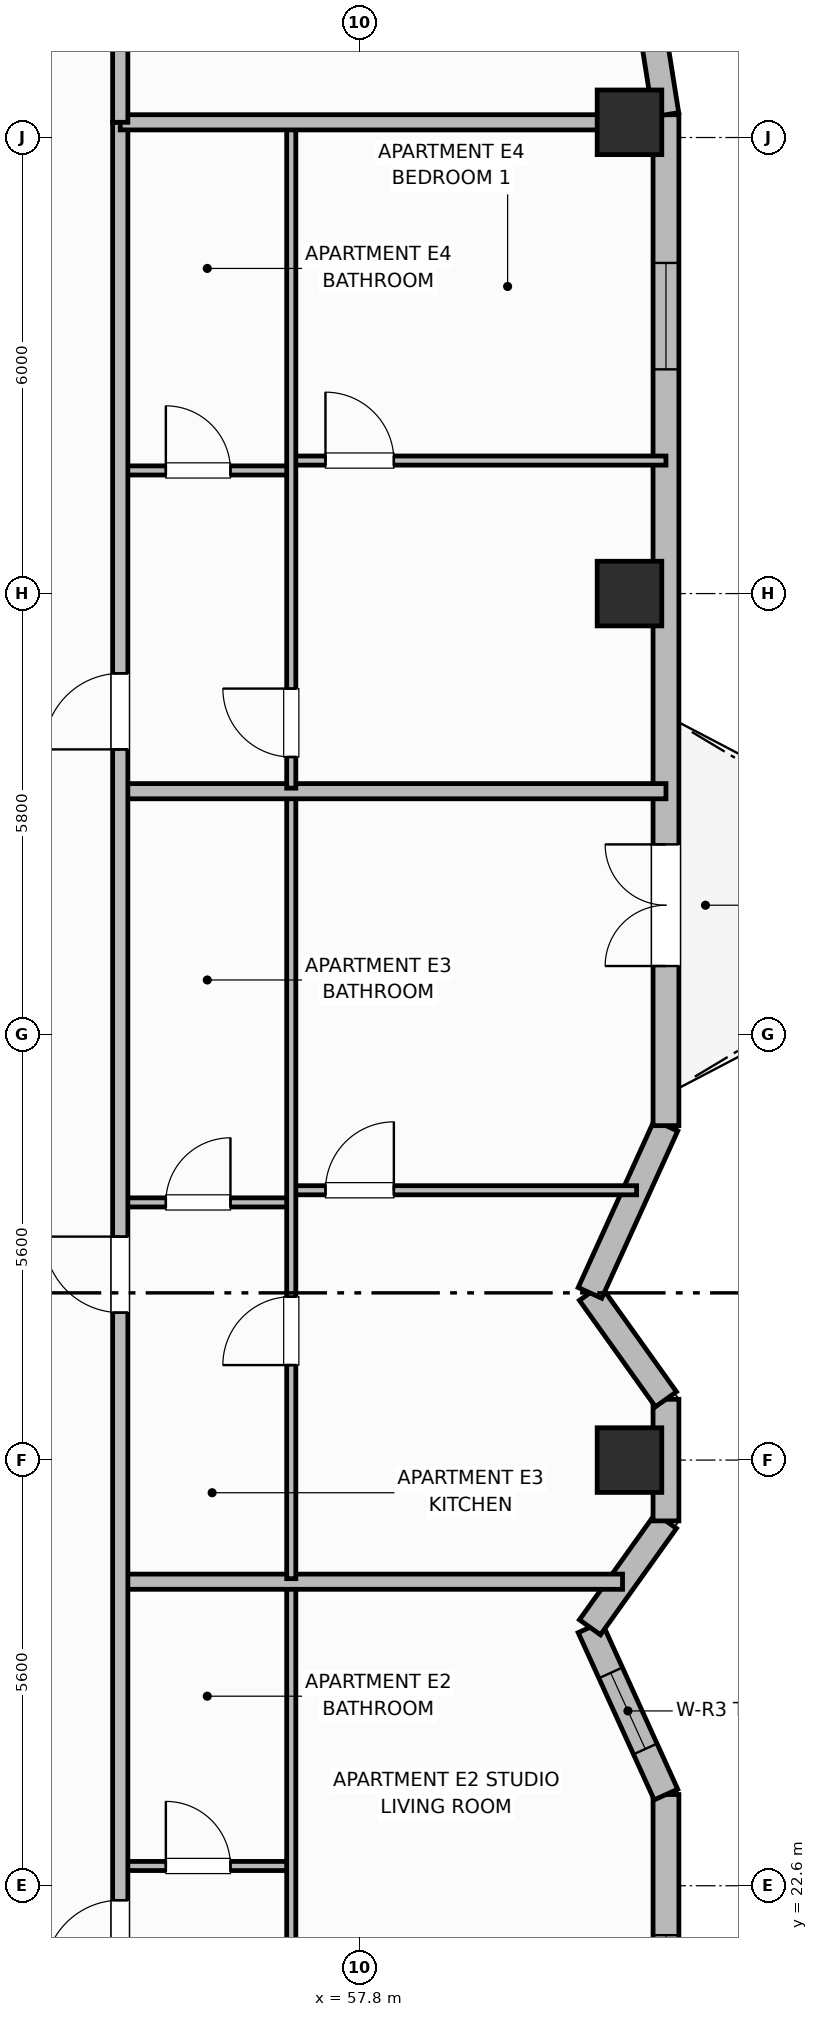
"""IFC4 building model, lengths in metres.
Left out: names, types, materials, properties, quantities, classifications, styles, units other than length and angle.
Written with IfcOpenShell. Run it as: python <this file> out.ifc"""

import sys

from ifc_helpers import new_model, si_unit, direction, frame, frame_2d, origin, origin_2d, place, context, subcontext, project, spatial, rectangle, extrude, element, fill, save


model = new_model("IFC4")
c1 = context("Model", 3, precision=1e-05, world=origin(), true_north=direction((0.0, 1.0)))
c2 = subcontext(c1, "Body", "Model", "MODEL_VIEW")
j1 = project(units=[si_unit("LENGTHUNIT", "METRE"), si_unit("PLANEANGLEUNIT", "RADIAN")], contexts=[c1])
p1 = place(None, origin())
s1 = spatial("IfcSite", under=j1, at=p1, CompositionType="ELEMENT")
p2 = place(p1, origin())
s2 = spatial("IfcBuilding", under=s1, at=p2, CompositionType="ELEMENT")
p3 = place(p2, frame((0.0, 0.0, 222.1)))
s3 = spatial("IfcBuildingStorey", under=s2, at=p3, CompositionType="ELEMENT", Elevation=222.1)
for number, where, z_axis, x_axis in (
    (1, (61.35, 28.2, 0.0), (0.0, 0.0, 1.0), (1.0, 0.0, 0.0)),
    (2, (61.35, 39.6, 0.0), (0.0, 0.0, 1.0), (1.0, 0.0, 0.0)),
    (3, (61.35, 45.8, 0.0), (0.0, 0.0, 1.0), (1.0, 0.0, 0.0)),
):
    element("IfcColumn", number, at=place(p3, frame(where, z_axis=z_axis, x_axis=x_axis)), inside=s3, PredefinedType="COLUMN", context=c2, shape_type="SweptSolid", body=[
        extrude(rectangle(XDim=0.85, YDim=0.85, at=origin_2d()), origin(), (0.0, 0.0, 1.0), 3.7),
    ])
p4 = place(p3, frame((61.83, 10.5, 0.0), z_axis=(0.0, 0.0, 1.0), x_axis=(0.0, 1.0, 0.0)))
e4 = element("IfcWall", 4, at=p4, inside=s3, PredefinedType="SOLIDWALL", context=c2, shape_type="SweptSolid", body=[
    extrude(rectangle(XDim=13.3, YDim=0.34, at=frame_2d((6.65, 0.0))), origin(), (0.0, 0.0, 1.0), 2.26),
])
p5 = place(p4, frame((1.85, 0.0, 0.3)))
e5 = element("IfcOpeningElement", 5, at=p5, cuts=e4, PredefinedType="OPENING", context=c2, shape_type="SweptSolid", body=[
    extrude(rectangle(XDim=1.6, YDim=1.9, at=frame_2d((0.8, 0.95))), frame((0.0, 0.18, 0.0), z_axis=(0.0, -1.0, 0.0), x_axis=(1.0, 0.0, 0.0)), (0.0, 0.0, 1.0), 0.36),
])
p6 = place(p4, frame((6.8, 0.0, 0.35)))
e6 = element("IfcOpeningElement", 6, at=p6, cuts=e4, PredefinedType="OPENING", context=c2, shape_type="SweptSolid", body=[
    extrude(rectangle(XDim=1.4, YDim=1.85, at=frame_2d((0.7, 0.925))), frame((0.0, 0.18, 0.0), z_axis=(0.0, -1.0, 0.0), x_axis=(1.0, 0.0, 0.0)), (0.0, 0.0, 1.0), 0.36),
])
p7 = place(p4, frame((9.85, 0.0, 0.3)))
e7 = element("IfcOpeningElement", 7, at=p7, cuts=e4, PredefinedType="OPENING", context=c2, shape_type="SweptSolid", body=[
    extrude(rectangle(XDim=1.6, YDim=1.9, at=frame_2d((0.8, 0.95))), frame((0.0, 0.18, 0.0), z_axis=(0.0, -1.0, 0.0), x_axis=(1.0, 0.0, 0.0)), (0.0, 0.0, 1.0), 0.36),
])
p8 = place(p3, frame((61.83, 23.8, 0.0), z_axis=(0.0, 0.0, 1.0), x_axis=(-0.413810555983, 0.910363017569, 0.0)))
e8 = element("IfcWall", 8, at=p8, inside=s3, PredefinedType="SOLIDWALL", context=c2, shape_type="SweptSolid", body=[
    extrude(rectangle(XDim=2.417, YDim=0.34, at=frame_2d((1.208, 0.0))), origin(), (0.0, 0.0, 1.0), 2.26),
])
p9 = place(p8, frame((0.658, 0.0, 0.45)))
e9 = element("IfcOpeningElement", 9, at=p9, cuts=e8, PredefinedType="OPENING", context=c2, shape_type="SweptSolid", body=[
    extrude(rectangle(XDim=1.1, YDim=1.65, at=frame_2d((0.55, 0.825))), frame((0.0, 0.18, 0.0), z_axis=(0.0, -1.0, 0.0), x_axis=(1.0, 0.0, 0.0)), (0.0, 0.0, 1.0), 0.36),
])
p10 = place(p3, frame((60.83, 26.0, 0.0), z_axis=(0.0, 0.0, 1.0), x_axis=(0.581265041318, 0.813714293681, 0.0)))
e10 = element("IfcWall", 10, at=p10, inside=s3, PredefinedType="SOLIDWALL", context=c2, shape_type="SweptSolid", body=[
    extrude(rectangle(XDim=1.72, YDim=0.34, at=frame_2d((0.86, 0.0))), origin(), (0.0, 0.0, 1.0), 2.26),
])
p11 = place(p3, frame((61.83, 27.4, 0.0), z_axis=(0.0, 0.0, 1.0), x_axis=(0.0, 1.0, 0.0)))
e11 = element("IfcWall", 11, at=p11, inside=s3, PredefinedType="SOLIDWALL", context=c2, shape_type="SweptSolid", body=[
    extrude(rectangle(XDim=1.6, YDim=0.34, at=frame_2d((0.8, 0.0))), origin(), (0.0, 0.0, 1.0), 2.26),
])
p12 = place(p3, frame((61.83, 29.0, 0.0), z_axis=(0.0, 0.0, 1.0), x_axis=(-0.581265041318, 0.813714293681, 0.0)))
e12 = element("IfcWall", 12, at=p12, inside=s3, PredefinedType="SOLIDWALL", context=c2, shape_type="SweptSolid", body=[
    extrude(rectangle(XDim=1.72, YDim=0.34, at=frame_2d((0.86, 0.0))), origin(), (0.0, 0.0, 1.0), 2.26),
])
p13 = place(p3, frame((60.83, 30.4, 0.0), z_axis=(0.0, 0.0, 1.0), x_axis=(0.413772500085, 0.910380315128, 0.0)))
e13 = element("IfcWall", 13, at=p13, inside=s3, PredefinedType="SOLIDWALL", context=c2, shape_type="SweptSolid", body=[
    extrude(rectangle(XDim=2.417, YDim=0.34, at=frame_2d((1.208, 0.0))), origin(), (0.0, 0.0, 1.0), 2.26),
])
p14 = place(p3, frame((61.83, 32.6, 0.0), z_axis=(0.0, 0.0, 1.0), x_axis=(0.0, 1.0, 0.0)))
e14 = element("IfcWall", 14, at=p14, inside=s3, PredefinedType="SOLIDWALL", context=c2, shape_type="SweptSolid", body=[
    extrude(rectangle(XDim=13.3, YDim=0.34, at=frame_2d((6.65, 0.0))), origin(), (0.0, 0.0, 1.0), 2.26),
])
p15 = place(p14, frame((2.1, 0.0, 0.0)))
e15 = element("IfcOpeningElement", 15, at=p15, cuts=e14, PredefinedType="OPENING", context=c2, shape_type="SweptSolid", body=[
    extrude(rectangle(XDim=1.6, YDim=2.1, at=frame_2d((0.8, 1.05))), frame((0.0, 0.18, 0.0), z_axis=(0.0, -1.0, 0.0), x_axis=(1.0, 0.0, 0.0)), (0.0, 0.0, 1.0), 0.36),
])
p16 = place(p14, frame((9.95, 0.0, 0.3)))
e16 = element("IfcOpeningElement", 16, at=p16, cuts=e14, PredefinedType="OPENING", context=c2, shape_type="SweptSolid", body=[
    extrude(rectangle(XDim=1.4, YDim=1.85, at=frame_2d((0.7, 0.925))), frame((0.0, 0.18, 0.0), z_axis=(0.0, -1.0, 0.0), x_axis=(1.0, 0.0, 0.0)), (0.0, 0.0, 1.0), 0.36),
])
p17 = place(p3, frame((61.83, 45.9, 0.0), z_axis=(0.0, 0.0, 1.0), x_axis=(-0.156481329164, 0.987680916907, 0.0)))
e17 = element("IfcWall", 17, at=p17, inside=s3, PredefinedType="SOLIDWALL", context=c2, shape_type="SweptSolid", body=[
    extrude(rectangle(XDim=1.136, YDim=0.34, at=frame_2d((0.568, 0.0))), origin(), (0.0, 0.0, 1.0), 2.26),
])
p18 = place(p3, frame((54.65, 22.86, 0.0), z_axis=(0.0, 0.0, 1.0), x_axis=(1.0, 0.0, 0.0)))
e18 = element("IfcWall", 18, at=p18, inside=s3, PredefinedType="PARTITIONING", context=c2, shape_type="SweptSolid", body=[
    extrude(rectangle(XDim=2.25, YDim=0.12, at=frame_2d((1.125, 0.0))), origin(), (0.0, 0.0, 1.0), 2.24),
])
p19 = place(p18, frame((0.6, 0.0, 0.0)))
e19 = element("IfcOpeningElement", 19, at=p19, cuts=e18, PredefinedType="OPENING", context=c2, shape_type="SweptSolid", body=[
    extrude(rectangle(XDim=0.85, YDim=2.1, at=frame_2d((0.425, 1.05))), frame((0.0, 0.07, 0.0), z_axis=(0.0, -1.0, 0.0), x_axis=(1.0, 0.0, 0.0)), (0.0, 0.0, 1.0), 0.14),
])
p20 = place(p3, frame((56.9, 19.44, 0.0), z_axis=(0.0, 0.0, 1.0), x_axis=(0.0, 1.0, 0.0)))
e20 = element("IfcWall", 20, at=p20, inside=s3, PredefinedType="PARTITIONING", context=c2, shape_type="SweptSolid", body=[
    extrude(rectangle(XDim=7.12, YDim=0.12, at=frame_2d((3.56, 0.0))), origin(), (0.0, 0.0, 1.0), 2.24),
])
p21 = place(p20, frame((0.41, 0.0, 0.0)))
e21 = element("IfcOpeningElement", 21, at=p21, cuts=e20, PredefinedType="OPENING", context=c2, shape_type="SweptSolid", body=[
    extrude(rectangle(XDim=0.9, YDim=2.1, at=frame_2d((0.45, 1.05))), frame((0.0, 0.07, 0.0), z_axis=(0.0, -1.0, 0.0), x_axis=(1.0, 0.0, 0.0)), (0.0, 0.0, 1.0), 0.14),
])
p22 = place(p3, frame((54.65, 26.6, 0.0), z_axis=(0.0, 0.0, 1.0), x_axis=(1.0, 0.0, 0.0)))
e22 = element("IfcWall", 22, at=p22, inside=s3, PredefinedType="PARTITIONING", context=c2, shape_type="SweptSolid", body=[
    extrude(rectangle(XDim=6.609, YDim=0.2, at=frame_2d((3.304, 0.0))), origin(), (0.0, 0.0, 1.0), 2.24),
])
p23 = place(p3, frame((54.65, 31.59, 0.0), z_axis=(0.0, 0.0, 1.0), x_axis=(1.0, 0.0, 0.0)))
e23 = element("IfcWall", 23, at=p23, inside=s3, PredefinedType="PARTITIONING", context=c2, shape_type="SweptSolid", body=[
    extrude(rectangle(XDim=2.25, YDim=0.12, at=frame_2d((1.125, 0.0))), origin(), (0.0, 0.0, 1.0), 2.24),
])
p24 = place(p23, frame((0.6, 0.0, 0.0)))
e24 = element("IfcOpeningElement", 24, at=p24, cuts=e23, PredefinedType="OPENING", context=c2, shape_type="SweptSolid", body=[
    extrude(rectangle(XDim=0.85, YDim=2.1, at=frame_2d((0.425, 1.05))), frame((0.0, 0.07, 0.0), z_axis=(0.0, -1.0, 0.0), x_axis=(1.0, 0.0, 0.0)), (0.0, 0.0, 1.0), 0.14),
])
p25 = place(p3, frame((56.9, 31.75, 0.0), z_axis=(0.0, 0.0, 1.0), x_axis=(1.0, 0.0, 0.0)))
e25 = element("IfcWall", 25, at=p25, inside=s3, PredefinedType="PARTITIONING", context=c2, shape_type="SweptSolid", body=[
    extrude(rectangle(XDim=4.544, YDim=0.12, at=frame_2d((2.272, 0.0))), origin(), (0.0, 0.0, 1.0), 2.24),
])
p26 = place(p25, frame((0.45, 0.0, 0.0)))
e26 = element("IfcOpeningElement", 26, at=p26, cuts=e25, PredefinedType="OPENING", context=c2, shape_type="SweptSolid", body=[
    extrude(rectangle(XDim=0.9, YDim=2.1, at=frame_2d((0.45, 1.05))), frame((0.0, 0.07, 0.0), z_axis=(0.0, -1.0, 0.0), x_axis=(1.0, 0.0, 0.0)), (0.0, 0.0, 1.0), 0.14),
])
p27 = place(p3, frame((56.9, 26.64, 0.0), z_axis=(0.0, 0.0, 1.0), x_axis=(0.0, 1.0, 0.0)))
e27 = element("IfcWall", 27, at=p27, inside=s3, PredefinedType="PARTITIONING", context=c2, shape_type="SweptSolid", body=[
    extrude(rectangle(XDim=10.32, YDim=0.12, at=frame_2d((5.16, 0.0))), origin(), (0.0, 0.0, 1.0), 2.24),
])
p28 = place(p27, frame((2.81, 0.0, 0.0)))
e28 = element("IfcOpeningElement", 28, at=p28, cuts=e27, PredefinedType="OPENING", context=c2, shape_type="SweptSolid", body=[
    extrude(rectangle(XDim=0.9, YDim=2.1, at=frame_2d((0.45, 1.05))), frame((0.0, 0.07, 0.0), z_axis=(0.0, -1.0, 0.0), x_axis=(1.0, 0.0, 0.0)), (0.0, 0.0, 1.0), 0.14),
])
p29 = place(p3, frame((54.65, 37.0, 0.0), z_axis=(0.0, 0.0, 1.0), x_axis=(1.0, 0.0, 0.0)))
e29 = element("IfcWall", 29, at=p29, inside=s3, PredefinedType="PARTITIONING", context=c2, shape_type="SweptSolid", body=[
    extrude(rectangle(XDim=7.18, YDim=0.2, at=frame_2d((3.59, 0.0))), origin(), (0.0, 0.0, 1.0), 2.24),
])
p30 = place(p3, frame((54.65, 41.22, 0.0), z_axis=(0.0, 0.0, 1.0), x_axis=(1.0, 0.0, 0.0)))
e30 = element("IfcWall", 30, at=p30, inside=s3, PredefinedType="PARTITIONING", context=c2, shape_type="SweptSolid", body=[
    extrude(rectangle(XDim=2.25, YDim=0.12, at=frame_2d((1.125, 0.0))), origin(), (0.0, 0.0, 1.0), 2.24),
])
p31 = place(p30, frame((0.6, 0.0, 0.0)))
e31 = element("IfcOpeningElement", 31, at=p31, cuts=e30, PredefinedType="OPENING", context=c2, shape_type="SweptSolid", body=[
    extrude(rectangle(XDim=0.85, YDim=2.1, at=frame_2d((0.425, 1.05))), frame((0.0, 0.07, 0.0), z_axis=(0.0, -1.0, 0.0), x_axis=(1.0, 0.0, 0.0)), (0.0, 0.0, 1.0), 0.14),
])
p32 = place(p3, frame((56.9, 41.35, 0.0), z_axis=(0.0, 0.0, 1.0), x_axis=(1.0, 0.0, 0.0)))
e32 = element("IfcWall", 32, at=p32, inside=s3, PredefinedType="PARTITIONING", context=c2, shape_type="SweptSolid", body=[
    extrude(rectangle(XDim=4.93, YDim=0.12, at=frame_2d((2.465, 0.0))), origin(), (0.0, 0.0, 1.0), 2.24),
])
p33 = place(p32, frame((0.45, 0.0, 0.0)))
e33 = element("IfcOpeningElement", 33, at=p33, cuts=e32, PredefinedType="OPENING", context=c2, shape_type="SweptSolid", body=[
    extrude(rectangle(XDim=0.9, YDim=2.1, at=frame_2d((0.45, 1.05))), frame((0.0, 0.07, 0.0), z_axis=(0.0, -1.0, 0.0), x_axis=(1.0, 0.0, 0.0)), (0.0, 0.0, 1.0), 0.14),
])
p34 = place(p3, frame((56.9, 37.04, 0.0), z_axis=(0.0, 0.0, 1.0), x_axis=(0.0, 1.0, 0.0)))
e34 = element("IfcWall", 34, at=p34, inside=s3, PredefinedType="PARTITIONING", context=c2, shape_type="SweptSolid", body=[
    extrude(rectangle(XDim=8.72, YDim=0.12, at=frame_2d((4.36, 0.0))), origin(), (0.0, 0.0, 1.0), 2.24),
])
p35 = place(p34, frame((0.41, 0.0, 0.0)))
e35 = element("IfcOpeningElement", 35, at=p35, cuts=e34, PredefinedType="OPENING", context=c2, shape_type="SweptSolid", body=[
    extrude(rectangle(XDim=0.9, YDim=2.1, at=frame_2d((0.45, 1.05))), frame((0.0, 0.07, 0.0), z_axis=(0.0, -1.0, 0.0), x_axis=(1.0, 0.0, 0.0)), (0.0, 0.0, 1.0), 0.14),
])
p36 = place(p3, frame((54.65, 10.6, 0.0), z_axis=(0.0, 0.0, 1.0), x_axis=(0.0, 1.0, 0.0)))
e36 = element("IfcWall", 36, at=p36, inside=s3, PredefinedType="PARTITIONING", context=c2, shape_type="SweptSolid", body=[
    extrude(rectangle(XDim=35.2, YDim=0.2, at=frame_2d((17.6, 0.0))), origin(), (0.0, 0.0, 1.0), 2.24),
])
p37 = place(p36, frame((2.65, 0.0, 0.0)))
e37 = element("IfcOpeningElement", 37, at=p37, cuts=e36, PredefinedType="OPENING", context=c2, shape_type="SweptSolid", body=[
    extrude(rectangle(XDim=1.0, YDim=2.15, at=frame_2d((0.5, 1.075))), frame((0.0, 0.11, 0.0), z_axis=(0.0, -1.0, 0.0), x_axis=(1.0, 0.0, 0.0)), (0.0, 0.0, 1.0), 0.22),
])
p38 = place(p36, frame((10.81, 0.0, 0.0)))
e38 = element("IfcOpeningElement", 38, at=p38, cuts=e36, PredefinedType="OPENING", context=c2, shape_type="SweptSolid", body=[
    extrude(rectangle(XDim=1.0, YDim=2.15, at=frame_2d((0.5, 1.075))), frame((0.0, 0.11, 0.0), z_axis=(0.0, -1.0, 0.0), x_axis=(1.0, 0.0, 0.0)), (0.0, 0.0, 1.0), 0.22),
])
p39 = place(p36, frame((19.54, 0.0, 0.0)))
e39 = element("IfcOpeningElement", 39, at=p39, cuts=e36, PredefinedType="OPENING", context=c2, shape_type="SweptSolid", body=[
    extrude(rectangle(XDim=1.0, YDim=2.15, at=frame_2d((0.5, 1.075))), frame((0.0, 0.11, 0.0), z_axis=(0.0, -1.0, 0.0), x_axis=(1.0, 0.0, 0.0)), (0.0, 0.0, 1.0), 0.22),
])
p40 = place(p36, frame((26.95, 0.0, 0.0)))
e40 = element("IfcOpeningElement", 40, at=p40, cuts=e36, PredefinedType="OPENING", context=c2, shape_type="SweptSolid", body=[
    extrude(rectangle(XDim=1.0, YDim=2.15, at=frame_2d((0.5, 1.075))), frame((0.0, 0.11, 0.0), z_axis=(0.0, -1.0, 0.0), x_axis=(1.0, 0.0, 0.0)), (0.0, 0.0, 1.0), 0.22),
])
p41 = place(p3, frame((54.65, 45.8, 0.0), z_axis=(0.0, 0.0, 1.0), x_axis=(1.0, 0.0, 0.0)))
e41 = element("IfcWall", 41, at=p41, inside=s3, PredefinedType="PARTITIONING", context=c2, shape_type="SweptSolid", body=[
    extrude(rectangle(XDim=6.76, YDim=0.2, at=frame_2d((3.38, 0.0))), origin(), (0.0, 0.0, 1.0), 2.24),
])
p42 = place(p3, frame((54.65, 45.8, 0.0), z_axis=(0.0, 0.0, 1.0), x_axis=(0.0, 1.0, 0.0)))
e42 = element("IfcWall", 42, at=p42, inside=s3, PredefinedType="PARTITIONING", context=c2, shape_type="SweptSolid", body=[
    extrude(rectangle(XDim=3.73, YDim=0.2, at=frame_2d((1.865, 0.0))), origin(), (0.0, 0.0, 1.0), 2.24),
])
p43 = place(p7, origin())
e43 = element("IfcWindow", 43, at=p43, inside=s3, PartitioningType="SINGLE_PANEL", PredefinedType="WINDOW", context=c2, shape_type="SweptSolid", body=[
    extrude(rectangle(XDim=1.6, YDim=1.9, at=frame_2d((0.8, 0.95))), frame((0.0, 0.03, 0.0), z_axis=(0.0, -1.0, 0.0), x_axis=(1.0, 0.0, 0.0)), (0.0, 0.0, 1.0), 0.06),
])
fill(e7, e43)
p44 = place(p9, origin())
e44 = element("IfcWindow", 44, at=p44, inside=s3, PartitioningType="SINGLE_PANEL", PredefinedType="WINDOW", context=c2, shape_type="SweptSolid", body=[
    extrude(rectangle(XDim=1.1, YDim=1.65, at=frame_2d((0.55, 0.825))), frame((0.0, 0.03, 0.0), z_axis=(0.0, -1.0, 0.0), x_axis=(1.0, 0.0, 0.0)), (0.0, 0.0, 1.0), 0.06),
])
fill(e9, e44)
p45 = place(p15, origin())
e45 = element("IfcDoor", 45, at=p45, inside=s3, OperationType="DOUBLE_DOOR_SINGLE_SWING", PredefinedType="DOOR", context=c2, shape_type="SweptSolid", body=[
    extrude(rectangle(XDim=1.6, YDim=2.1, at=frame_2d((0.8, 1.05))), frame((0.0, 0.025, 0.0), z_axis=(0.0, -1.0, 0.0), x_axis=(1.0, 0.0, 0.0)), (0.0, 0.0, 1.0), 0.05),
])
fill(e15, e45)
p46 = place(p16, origin())
e46 = element("IfcWindow", 46, at=p46, inside=s3, PartitioningType="SINGLE_PANEL", PredefinedType="WINDOW", context=c2, shape_type="SweptSolid", body=[
    extrude(rectangle(XDim=1.4, YDim=1.85, at=frame_2d((0.7, 0.925))), frame((0.0, 0.03, 0.0), z_axis=(0.0, -1.0, 0.0), x_axis=(1.0, 0.0, 0.0)), (0.0, 0.0, 1.0), 0.06),
])
fill(e16, e46)
p47 = place(p19, origin())
e47 = element("IfcDoor", 47, at=p47, inside=s3, OperationType="SINGLE_SWING_LEFT", PredefinedType="DOOR", context=c2, shape_type="SweptSolid", body=[
    extrude(rectangle(XDim=0.85, YDim=2.1, at=frame_2d((0.425, 1.05))), frame((0.0, 0.025, 0.0), z_axis=(0.0, -1.0, 0.0), x_axis=(1.0, 0.0, 0.0)), (0.0, 0.0, 1.0), 0.05),
])
fill(e19, e47)
p48 = place(p24, origin())
e48 = element("IfcDoor", 48, at=p48, inside=s3, OperationType="SINGLE_SWING_RIGHT", PredefinedType="DOOR", context=c2, shape_type="SweptSolid", body=[
    extrude(rectangle(XDim=0.85, YDim=2.1, at=frame_2d((0.425, 1.05))), frame((0.0, 0.025, 0.0), z_axis=(0.0, -1.0, 0.0), x_axis=(1.0, 0.0, 0.0)), (0.0, 0.0, 1.0), 0.05),
])
fill(e24, e48)
p49 = place(p26, origin())
e49 = element("IfcDoor", 49, at=p49, inside=s3, OperationType="SINGLE_SWING_RIGHT", PredefinedType="DOOR", context=c2, shape_type="SweptSolid", body=[
    extrude(rectangle(XDim=0.9, YDim=2.1, at=frame_2d((0.45, 1.05))), frame((0.0, 0.025, 0.0), z_axis=(0.0, -1.0, 0.0), x_axis=(1.0, 0.0, 0.0)), (0.0, 0.0, 1.0), 0.05),
])
fill(e26, e49)
p50 = place(p28, origin())
e50 = element("IfcDoor", 50, at=p50, inside=s3, OperationType="SINGLE_SWING_LEFT", PredefinedType="DOOR", context=c2, shape_type="SweptSolid", body=[
    extrude(rectangle(XDim=0.9, YDim=2.1, at=frame_2d((0.45, 1.05))), frame((0.0, 0.025, 0.0), z_axis=(0.0, -1.0, 0.0), x_axis=(1.0, 0.0, 0.0)), (0.0, 0.0, 1.0), 0.05),
])
fill(e28, e50)
p51 = place(p31, origin())
e51 = element("IfcDoor", 51, at=p51, inside=s3, OperationType="SINGLE_SWING_LEFT", PredefinedType="DOOR", context=c2, shape_type="SweptSolid", body=[
    extrude(rectangle(XDim=0.85, YDim=2.1, at=frame_2d((0.425, 1.05))), frame((0.0, 0.025, 0.0), z_axis=(0.0, -1.0, 0.0), x_axis=(1.0, 0.0, 0.0)), (0.0, 0.0, 1.0), 0.05),
])
fill(e31, e51)
p52 = place(p33, origin())
e52 = element("IfcDoor", 52, at=p52, inside=s3, OperationType="SINGLE_SWING_LEFT", PredefinedType="DOOR", context=c2, shape_type="SweptSolid", body=[
    extrude(rectangle(XDim=0.9, YDim=2.1, at=frame_2d((0.45, 1.05))), frame((0.0, 0.025, 0.0), z_axis=(0.0, -1.0, 0.0), x_axis=(1.0, 0.0, 0.0)), (0.0, 0.0, 1.0), 0.05),
])
fill(e33, e52)
p53 = place(p35, origin())
e53 = element("IfcDoor", 53, at=p53, inside=s3, OperationType="SINGLE_SWING_RIGHT", PredefinedType="DOOR", context=c2, shape_type="SweptSolid", body=[
    extrude(rectangle(XDim=0.9, YDim=2.1, at=frame_2d((0.45, 1.05))), frame((0.0, 0.025, 0.0), z_axis=(0.0, -1.0, 0.0), x_axis=(1.0, 0.0, 0.0)), (0.0, 0.0, 1.0), 0.05),
])
fill(e35, e53)
p54 = place(p38, origin())
e54 = element("IfcDoor", 54, at=p54, inside=s3, OperationType="SINGLE_SWING_LEFT", PredefinedType="DOOR", context=c2, shape_type="SweptSolid", body=[
    extrude(rectangle(XDim=1.0, YDim=2.15, at=frame_2d((0.5, 1.075))), frame((0.0, 0.025, 0.0), z_axis=(0.0, -1.0, 0.0), x_axis=(1.0, 0.0, 0.0)), (0.0, 0.0, 1.0), 0.05),
])
fill(e38, e54)
p55 = place(p39, origin())
e55 = element("IfcDoor", 55, at=p55, inside=s3, OperationType="SINGLE_SWING_RIGHT", PredefinedType="DOOR", context=c2, shape_type="SweptSolid", body=[
    extrude(rectangle(XDim=1.0, YDim=2.15, at=frame_2d((0.5, 1.075))), frame((0.0, 0.025, 0.0), z_axis=(0.0, -1.0, 0.0), x_axis=(1.0, 0.0, 0.0)), (0.0, 0.0, 1.0), 0.05),
])
fill(e39, e55)
p56 = place(p40, origin())
e56 = element("IfcDoor", 56, at=p56, inside=s3, OperationType="SINGLE_SWING_LEFT", PredefinedType="DOOR", context=c2, shape_type="SweptSolid", body=[
    extrude(rectangle(XDim=1.0, YDim=2.15, at=frame_2d((0.5, 1.075))), frame((0.0, 0.025, 0.0), z_axis=(0.0, -1.0, 0.0), x_axis=(1.0, 0.0, 0.0)), (0.0, 0.0, 1.0), 0.05),
])
fill(e40, e56)
save(model, sys.argv[1])
